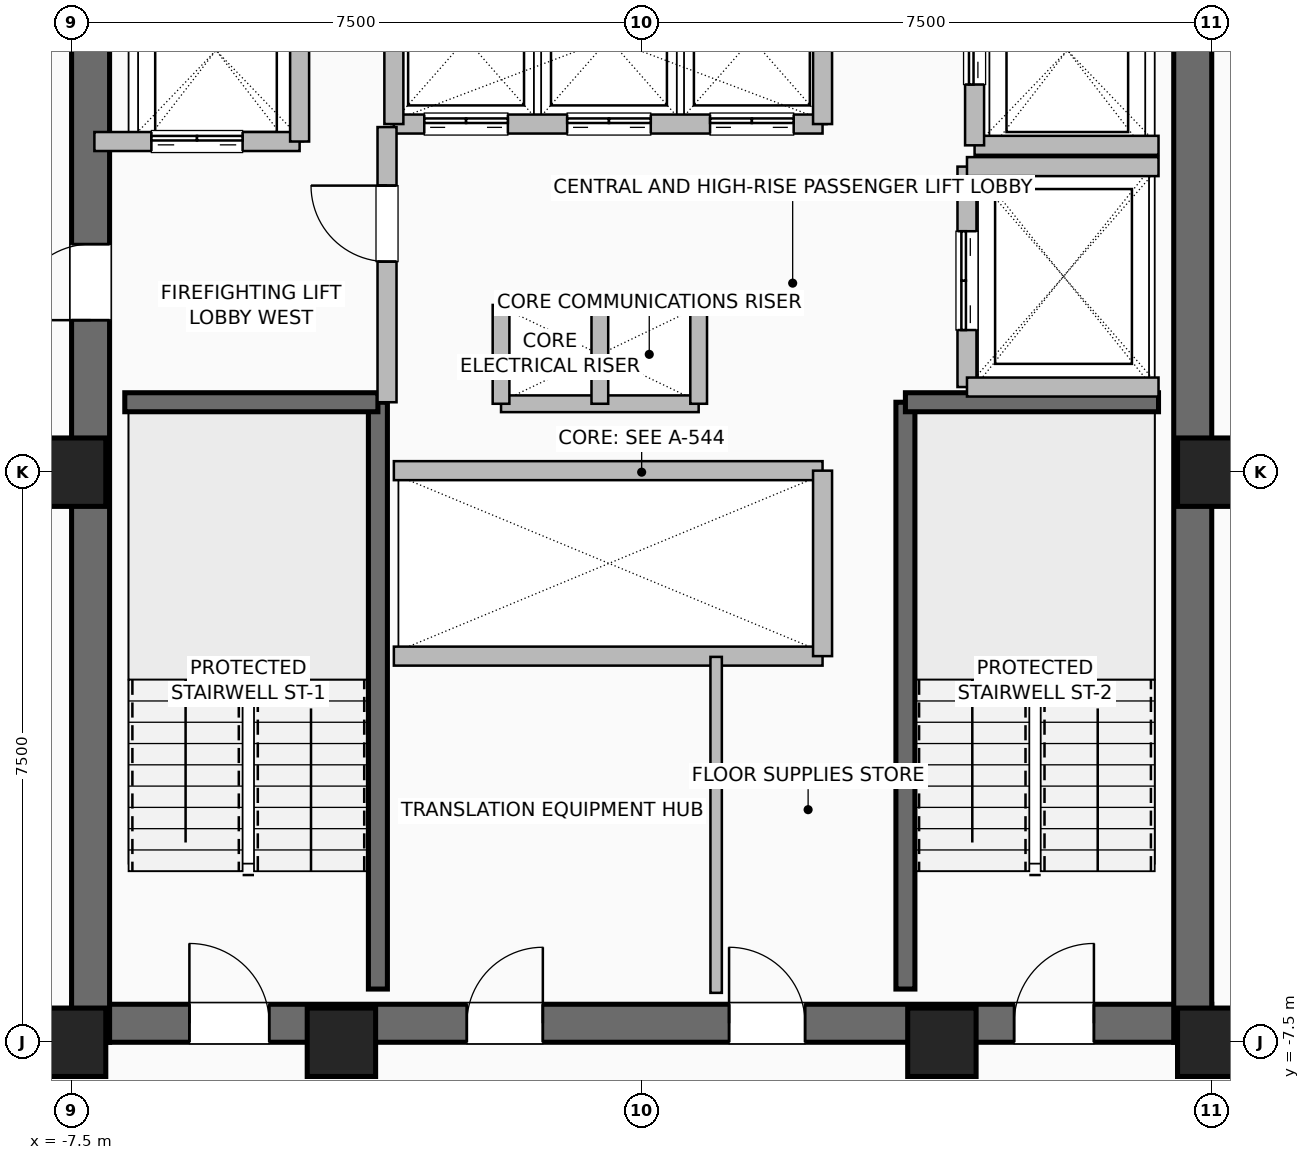
"""IFC4 building model, lengths in metres.
Left out: names, types, materials, properties, quantities, classifications, styles, units other than length and angle.
Written with IfcOpenShell. Run it as: python <this file> out.ifc"""

import sys

from ifc_helpers import new_model, si_unit, direction, frame, frame_2d, origin, origin_2d, place, context, subcontext, project, spatial, rectangle, hollow_rectangle, extrude, element, fill, save


model = new_model("IFC4")
c1 = context("Model", 3, precision=1e-05, world=origin(), true_north=direction((0.0, 1.0)))
c2 = subcontext(c1, "Body", "Model", "MODEL_VIEW")
j1 = project(units=[si_unit("LENGTHUNIT", "METRE"), si_unit("PLANEANGLEUNIT", "RADIAN")], contexts=[c1])
p1 = place(None, origin())
s1 = spatial("IfcSite", under=j1, at=p1, CompositionType="ELEMENT")
p2 = place(p1, origin())
s2 = spatial("IfcBuilding", under=s1, at=p2, CompositionType="ELEMENT")
p3 = place(p2, frame((0.0, 0.0, 169.8)))
s3 = spatial("IfcBuildingStorey", under=s2, at=p3, CompositionType="ELEMENT", Elevation=169.8)
for number, where, z_axis, x_axis in (
    (1, (-7.5, -7.5, 0.0), (0.0, 0.0, 1.0), (1.0, 0.0, 0.0)),
    (2, (-3.95, -7.5, 0.0), (0.0, 0.0, 1.0), (1.0, 0.0, 0.0)),
    (3, (3.95, -7.5, 0.0), (0.0, 0.0, 1.0), (1.0, 0.0, 0.0)),
    (4, (7.5, -7.5, 0.0), (0.0, 0.0, 1.0), (1.0, 0.0, 0.0)),
    (5, (7.5, 0.0, 0.0), (0.0, 0.0, 1.0), (1.0, 0.0, 0.0)),
    (6, (-7.5, 0.0, 0.0), (0.0, 0.0, 1.0), (1.0, 0.0, 0.0)),
):
    element("IfcColumn", number, at=place(p3, frame(where, z_axis=z_axis, x_axis=x_axis)), inside=s3, PredefinedType="COLUMN", context=c2, shape_type="SweptSolid", body=[
        extrude(hollow_rectangle(XDim=0.9, YDim=0.9, WallThickness=0.045, at=origin_2d()), origin(), (0.0, 0.0, 1.0), 3.6),
    ])
p4 = place(p3, frame((-7.5, -7.25, 0.0), z_axis=(0.0, 0.0, 1.0), x_axis=(1.0, 0.0, 0.0)))
e7 = element("IfcWall", 7, at=p4, inside=s3, PredefinedType="SHEAR", context=c2, shape_type="SweptSolid", body=[
    extrude(rectangle(XDim=15.0, YDim=0.5, at=frame_2d((7.5, 0.0))), origin(), (0.0, 0.0, 1.0), 3.36),
])
p5 = place(p4, frame((1.55, 0.0, 0.0)))
e8 = element("IfcOpeningElement", 8, at=p5, cuts=e7, PredefinedType="OPENING", context=c2, shape_type="SweptSolid", body=[
    extrude(rectangle(XDim=1.05, YDim=2.08, at=frame_2d((0.525, 1.04))), frame((0.0, 0.26, 0.0), z_axis=(0.0, -1.0, 0.0), x_axis=(1.0, 0.0, 0.0)), (0.0, 0.0, 1.0), 0.52),
])
p6 = place(p4, frame((12.4, 0.0, 0.0)))
e9 = element("IfcOpeningElement", 9, at=p6, cuts=e7, PredefinedType="OPENING", context=c2, shape_type="SweptSolid", body=[
    extrude(rectangle(XDim=1.05, YDim=2.08, at=frame_2d((0.525, 1.04))), frame((0.0, 0.26, 0.0), z_axis=(0.0, -1.0, 0.0), x_axis=(1.0, 0.0, 0.0)), (0.0, 0.0, 1.0), 0.52),
])
p7 = place(p4, frame((5.2, 0.0, 0.0)))
e10 = element("IfcOpeningElement", 10, at=p7, cuts=e7, PredefinedType="OPENING", context=c2, shape_type="SweptSolid", body=[
    extrude(rectangle(XDim=1.0, YDim=2.08, at=frame_2d((0.5, 1.04))), frame((0.0, 0.26, 0.0), z_axis=(0.0, -1.0, 0.0), x_axis=(1.0, 0.0, 0.0)), (0.0, 0.0, 1.0), 0.52),
])
p8 = place(p4, frame((8.65, 0.0, 0.0)))
e11 = element("IfcOpeningElement", 11, at=p8, cuts=e7, PredefinedType="OPENING", context=c2, shape_type="SweptSolid", body=[
    extrude(rectangle(XDim=1.0, YDim=2.08, at=frame_2d((0.5, 1.04))), frame((0.0, 0.26, 0.0), z_axis=(0.0, -1.0, 0.0), x_axis=(1.0, 0.0, 0.0)), (0.0, 0.0, 1.0), 0.52),
])
p9 = place(p3, frame((-7.25, -7.5, 0.0), z_axis=(0.0, 0.0, 1.0), x_axis=(0.0, 1.0, 0.0)))
e12 = element("IfcWall", 12, at=p9, inside=s3, PredefinedType="SHEAR", context=c2, shape_type="SweptSolid", body=[
    extrude(rectangle(XDim=15.0, YDim=0.5, at=frame_2d((7.5, 0.0))), origin(), (0.0, 0.0, 1.0), 3.36),
])
p10 = place(p9, frame((9.5, 0.0, 0.0)))
e13 = element("IfcOpeningElement", 13, at=p10, cuts=e12, PredefinedType="OPENING", context=c2, shape_type="SweptSolid", body=[
    extrude(rectangle(XDim=1.0, YDim=2.08, at=frame_2d((0.5, 1.04))), frame((0.0, 0.26, 0.0), z_axis=(0.0, -1.0, 0.0), x_axis=(1.0, 0.0, 0.0)), (0.0, 0.0, 1.0), 0.52),
])
p11 = place(p3, frame((7.25, -7.5, 0.0), z_axis=(0.0, 0.0, 1.0), x_axis=(0.0, 1.0, 0.0)))
e14 = element("IfcWall", 14, at=p11, inside=s3, PredefinedType="SHEAR", context=c2, shape_type="SweptSolid", body=[
    extrude(rectangle(XDim=15.0, YDim=0.5, at=frame_2d((7.5, 0.0))), origin(), (0.0, 0.0, 1.0), 3.36),
])
p12 = place(p3, frame((-3.47, -6.8, 0.0), z_axis=(0.0, 0.0, 1.0), x_axis=(0.0, 1.0, 0.0)))
e15 = element("IfcWall", 15, at=p12, inside=s3, PredefinedType="SHEAR", context=c2, shape_type="SweptSolid", body=[
    extrude(rectangle(XDim=7.72, YDim=0.25, at=frame_2d((3.86, 0.0))), origin(), (0.0, 0.0, 1.0), 3.36),
])
p13 = place(p3, frame((-6.8, 0.92, 0.0), z_axis=(0.0, 0.0, 1.0), x_axis=(1.0, 0.0, 0.0)))
e16 = element("IfcWall", 16, at=p13, inside=s3, PredefinedType="SHEAR", context=c2, shape_type="SweptSolid", body=[
    extrude(rectangle(XDim=3.33, YDim=0.25, at=frame_2d((1.665, 0.0))), origin(), (0.0, 0.0, 1.0), 3.36),
])
p14 = place(p3, frame((3.47, -6.8, 0.0), z_axis=(0.0, 0.0, 1.0), x_axis=(0.0, 1.0, 0.0)))
e17 = element("IfcWall", 17, at=p14, inside=s3, PredefinedType="SHEAR", context=c2, shape_type="SweptSolid", body=[
    extrude(rectangle(XDim=7.72, YDim=0.25, at=frame_2d((3.86, 0.0))), origin(), (0.0, 0.0, 1.0), 3.36),
])
p15 = place(p3, frame((3.47, 0.92, 0.0), z_axis=(0.0, 0.0, 1.0), x_axis=(1.0, 0.0, 0.0)))
e18 = element("IfcWall", 18, at=p15, inside=s3, PredefinedType="SHEAR", context=c2, shape_type="SweptSolid", body=[
    extrude(rectangle(XDim=3.33, YDim=0.25, at=frame_2d((1.665, 0.0))), origin(), (0.0, 0.0, 1.0), 3.36),
])
for number, where, z_axis, x_axis in (
    (19, (-1.85, 2.2, 0.0), (0.0, 0.0, 1.0), (1.0, 0.0, 0.0)),
    (20, (-1.85, 0.9, 0.0), (0.0, 0.0, 1.0), (1.0, 0.0, 0.0)),
):
    element("IfcWall", number, at=place(p3, frame(where, z_axis=z_axis, x_axis=x_axis)), inside=s3, PredefinedType="PARTITIONING", context=c2, shape_type="SweptSolid", body=[
        extrude(rectangle(XDim=2.6, YDim=0.22, at=frame_2d((1.3, 0.0))), origin(), (0.0, 0.0, 1.0), 3.36),
    ])
for number, where, z_axis, x_axis in (
    (21, (-0.55, 0.9, 0.0), (0.0, 0.0, 1.0), (0.0, 1.0, 0.0)),
    (22, (0.75, 0.9, 0.0), (0.0, 0.0, 1.0), (0.0, 1.0, 0.0)),
    (23, (-1.85, 0.9, 0.0), (0.0, 0.0, 1.0), (0.0, 1.0, 0.0)),
):
    element("IfcWall", number, at=place(p3, frame(where, z_axis=z_axis, x_axis=x_axis)), inside=s3, PredefinedType="PARTITIONING", context=c2, shape_type="SweptSolid", body=[
        extrude(rectangle(XDim=1.3, YDim=0.22, at=frame_2d((0.65, 0.0))), origin(), (0.0, 0.0, 1.0), 3.36),
    ])
for number, where, z_axis, x_axis in (
    (24, (-3.26, 0.02, 0.0), (0.0, 0.0, 1.0), (1.0, 0.0, 0.0)),
    (25, (-3.26, -2.42, 0.0), (0.0, 0.0, 1.0), (1.0, 0.0, 0.0)),
):
    element("IfcWall", number, at=place(p3, frame(where, z_axis=z_axis, x_axis=x_axis)), inside=s3, PredefinedType="SHEAR", context=c2, shape_type="SweptSolid", body=[
        extrude(rectangle(XDim=5.64, YDim=0.25, at=frame_2d((2.82, 0.0))), origin(), (0.0, 0.0, 1.0), 3.36),
    ])
p16 = place(p3, frame((2.38, -2.42, 0.0), z_axis=(0.0, 0.0, 1.0), x_axis=(0.0, 1.0, 0.0)))
e26 = element("IfcWall", 26, at=p16, inside=s3, PredefinedType="SHEAR", context=c2, shape_type="SweptSolid", body=[
    extrude(rectangle(XDim=2.44, YDim=0.25, at=frame_2d((1.22, 0.0))), origin(), (0.0, 0.0, 1.0), 3.36),
])
p17 = place(p3, frame((-3.26, 4.58, 0.0), z_axis=(0.0, 0.0, 1.0), x_axis=(1.0, 0.0, 0.0)))
e27 = element("IfcWall", 27, at=p17, inside=s3, PredefinedType="SHEAR", context=c2, shape_type="SweptSolid", body=[
    extrude(rectangle(XDim=5.64, YDim=0.25, at=frame_2d((2.82, 0.0))), origin(), (0.0, 0.0, 1.0), 3.36),
])
p18 = place(p17, frame((0.4, 0.0, 0.0)))
e28 = element("IfcOpeningElement", 28, at=p18, cuts=e27, PredefinedType="OPENING", context=c2, shape_type="SweptSolid", body=[
    extrude(rectangle(XDim=1.1, YDim=2.2, at=frame_2d((0.55, 1.1))), frame((0.0, 0.135, 0.0), z_axis=(0.0, -1.0, 0.0), x_axis=(1.0, 0.0, 0.0)), (0.0, 0.0, 1.0), 0.27),
])
p19 = place(p17, frame((2.28, 0.0, 0.0)))
e29 = element("IfcOpeningElement", 29, at=p19, cuts=e27, PredefinedType="OPENING", context=c2, shape_type="SweptSolid", body=[
    extrude(rectangle(XDim=1.1, YDim=2.2, at=frame_2d((0.55, 1.1))), frame((0.0, 0.135, 0.0), z_axis=(0.0, -1.0, 0.0), x_axis=(1.0, 0.0, 0.0)), (0.0, 0.0, 1.0), 0.27),
])
p20 = place(p17, frame((4.16, 0.0, 0.0)))
e30 = element("IfcOpeningElement", 30, at=p20, cuts=e27, PredefinedType="OPENING", context=c2, shape_type="SweptSolid", body=[
    extrude(rectangle(XDim=1.1, YDim=2.2, at=frame_2d((0.55, 1.1))), frame((0.0, 0.135, 0.0), z_axis=(0.0, -1.0, 0.0), x_axis=(1.0, 0.0, 0.0)), (0.0, 0.0, 1.0), 0.27),
])
for number, where, z_axis, x_axis in (
    (31, (-3.26, 4.58, 0.0), (0.0, 0.0, 1.0), (0.0, 1.0, 0.0)),
    (32, (2.38, 4.58, 0.0), (0.0, 0.0, 1.0), (0.0, 1.0, 0.0)),
):
    element("IfcWall", number, at=place(p3, frame(where, z_axis=z_axis, x_axis=x_axis)), inside=s3, PredefinedType="SHEAR", context=c2, shape_type="SweptSolid", body=[
        extrude(rectangle(XDim=2.22, YDim=0.25, at=frame_2d((1.11, 0.0))), origin(), (0.0, 0.0, 1.0), 3.36),
    ])
p21 = place(p3, frame((-7.2, 4.35, 0.0), z_axis=(0.0, 0.0, 1.0), x_axis=(1.0, 0.0, 0.0)))
e33 = element("IfcWall", 33, at=p21, inside=s3, PredefinedType="SHEAR", context=c2, shape_type="SweptSolid", body=[
    extrude(rectangle(XDim=2.7, YDim=0.25, at=frame_2d((1.35, 0.0))), origin(), (0.0, 0.0, 1.0), 3.36),
])
p22 = place(p21, frame((0.75, 0.0, 0.0)))
e34 = element("IfcOpeningElement", 34, at=p22, cuts=e33, PredefinedType="OPENING", context=c2, shape_type="SweptSolid", body=[
    extrude(rectangle(XDim=1.2, YDim=2.2, at=frame_2d((0.6, 1.1))), frame((0.0, 0.135, 0.0), z_axis=(0.0, -1.0, 0.0), x_axis=(1.0, 0.0, 0.0)), (0.0, 0.0, 1.0), 0.27),
])
p23 = place(p3, frame((-4.5, 4.35, 0.0), z_axis=(0.0, 0.0, 1.0), x_axis=(0.0, 1.0, 0.0)))
e35 = element("IfcWall", 35, at=p23, inside=s3, PredefinedType="SHEAR", context=c2, shape_type="SweptSolid", body=[
    extrude(rectangle(XDim=2.85, YDim=0.25, at=frame_2d((1.425, 0.0))), origin(), (0.0, 0.0, 1.0), 3.36),
])
p24 = place(p3, frame((4.38, 4.3, 0.0), z_axis=(0.0, 0.0, 1.0), x_axis=(1.0, 0.0, 0.0)))
e36 = element("IfcWall", 36, at=p24, inside=s3, PredefinedType="SHEAR", context=c2, shape_type="SweptSolid", body=[
    extrude(rectangle(XDim=2.42, YDim=0.25, at=frame_2d((1.21, 0.0))), origin(), (0.0, 0.0, 1.0), 3.36),
])
p25 = place(p3, frame((4.38, 4.3, 0.0), z_axis=(0.0, 0.0, 1.0), x_axis=(0.0, 1.0, 0.0)))
e37 = element("IfcWall", 37, at=p25, inside=s3, PredefinedType="SHEAR", context=c2, shape_type="SweptSolid", body=[
    extrude(rectangle(XDim=2.5, YDim=0.25, at=frame_2d((1.25, 0.0))), origin(), (0.0, 0.0, 1.0), 3.36),
])
p26 = place(p25, frame((0.8, 0.0, 0.0)))
e38 = element("IfcOpeningElement", 38, at=p26, cuts=e37, PredefinedType="OPENING", context=c2, shape_type="SweptSolid", body=[
    extrude(rectangle(XDim=1.2, YDim=2.2, at=frame_2d((0.6, 1.1))), frame((0.0, 0.135, 0.0), z_axis=(0.0, -1.0, 0.0), x_axis=(1.0, 0.0, 0.0)), (0.0, 0.0, 1.0), 0.27),
])
p27 = place(p3, frame((4.28, 1.12, 0.0), z_axis=(0.0, 0.0, 1.0), x_axis=(0.0, 1.0, 0.0)))
e39 = element("IfcWall", 39, at=p27, inside=s3, PredefinedType="SHEAR", context=c2, shape_type="SweptSolid", body=[
    extrude(rectangle(XDim=2.9, YDim=0.25, at=frame_2d((1.45, 0.0))), origin(), (0.0, 0.0, 1.0), 3.36),
])
p28 = place(p27, frame((0.75, 0.0, 0.0)))
e40 = element("IfcOpeningElement", 40, at=p28, cuts=e39, PredefinedType="OPENING", context=c2, shape_type="SweptSolid", body=[
    extrude(rectangle(XDim=1.3, YDim=2.3, at=frame_2d((0.65, 1.15))), frame((0.0, 0.135, 0.0), z_axis=(0.0, -1.0, 0.0), x_axis=(1.0, 0.0, 0.0)), (0.0, 0.0, 1.0), 0.27),
])
for number, where, z_axis, x_axis in (
    (41, (4.28, 1.12, 0.0), (0.0, 0.0, 1.0), (1.0, 0.0, 0.0)),
    (42, (4.28, 4.02, 0.0), (0.0, 0.0, 1.0), (1.0, 0.0, 0.0)),
):
    element("IfcWall", number, at=place(p3, frame(where, z_axis=z_axis, x_axis=x_axis)), inside=s3, PredefinedType="SHEAR", context=c2, shape_type="SweptSolid", body=[
        extrude(rectangle(XDim=2.52, YDim=0.25, at=frame_2d((1.26, 0.0))), origin(), (0.0, 0.0, 1.0), 3.36),
    ])
p29 = place(p3, frame((-3.35, 0.92, 0.0), z_axis=(0.0, 0.0, 1.0), x_axis=(0.0, 1.0, 0.0)))
e43 = element("IfcWall", 43, at=p29, inside=s3, PredefinedType="SHEAR", context=c2, shape_type="SweptSolid", body=[
    extrude(rectangle(XDim=3.62, YDim=0.25, at=frame_2d((1.81, 0.0))), origin(), (0.0, 0.0, 1.0), 3.36),
])
p30 = place(p29, frame((1.85, 0.0, 0.0)))
e44 = element("IfcOpeningElement", 44, at=p30, cuts=e43, PredefinedType="OPENING", context=c2, shape_type="SweptSolid", body=[
    extrude(rectangle(XDim=1.0, YDim=2.08, at=frame_2d((0.5, 1.04))), frame((0.0, 0.135, 0.0), z_axis=(0.0, -1.0, 0.0), x_axis=(1.0, 0.0, 0.0)), (0.0, 0.0, 1.0), 0.27),
])
p31 = place(p3, frame((0.98, -6.85, 0.0), z_axis=(0.0, 0.0, 1.0), x_axis=(0.0, 1.0, 0.0)))
e45 = element("IfcWall", 45, at=p31, inside=s3, PredefinedType="PARTITIONING", context=c2, shape_type="SweptSolid", body=[
    extrude(rectangle(XDim=4.42, YDim=0.15, at=frame_2d((2.21, 0.0))), origin(), (0.0, 0.0, 1.0), 3.36),
])
p32 = place(p3, frame((7.45, -7.48, 0.0), z_axis=(0.0, 0.0, 1.0), x_axis=(1.0, 0.0, 0.0)))
e46 = element("IfcWall", 46, at=p32, inside=s3, PredefinedType="PARTITIONING", context=c2, shape_type="SweptSolid", body=[
    extrude(rectangle(XDim=0.95, YDim=0.15, at=frame_2d((0.475, 0.0))), origin(), (0.0, 0.0, 1.0), 3.36),
])
p33 = place(p5, origin())
e47 = element("IfcDoor", 47, at=p33, inside=s3, OperationType="SINGLE_SWING_LEFT", PredefinedType="DOOR", context=c2, shape_type="SweptSolid", body=[
    extrude(rectangle(XDim=1.05, YDim=2.08, at=frame_2d((0.525, 1.04))), frame((0.0, 0.025, 0.0), z_axis=(0.0, -1.0, 0.0), x_axis=(1.0, 0.0, 0.0)), (0.0, 0.0, 1.0), 0.05),
])
fill(e8, e47)
p34 = place(p6, origin())
e48 = element("IfcDoor", 48, at=p34, inside=s3, OperationType="SINGLE_SWING_RIGHT", PredefinedType="DOOR", context=c2, shape_type="SweptSolid", body=[
    extrude(rectangle(XDim=1.05, YDim=2.08, at=frame_2d((0.525, 1.04))), frame((0.0, 0.025, 0.0), z_axis=(0.0, -1.0, 0.0), x_axis=(1.0, 0.0, 0.0)), (0.0, 0.0, 1.0), 0.05),
])
fill(e9, e48)
p35 = place(p10, origin())
e49 = element("IfcDoor", 49, at=p35, inside=s3, OperationType="SINGLE_SWING_LEFT", PredefinedType="DOOR", context=c2, shape_type="SweptSolid", body=[
    extrude(rectangle(XDim=1.0, YDim=2.08, at=frame_2d((0.5, 1.04))), frame((0.0, 0.025, 0.0), z_axis=(0.0, -1.0, 0.0), x_axis=(1.0, 0.0, 0.0)), (0.0, 0.0, 1.0), 0.05),
])
fill(e13, e49)
p36 = place(p7, origin())
e50 = element("IfcDoor", 50, at=p36, inside=s3, OperationType="SINGLE_SWING_RIGHT", PredefinedType="DOOR", context=c2, shape_type="SweptSolid", body=[
    extrude(rectangle(XDim=1.0, YDim=2.08, at=frame_2d((0.5, 1.04))), frame((0.0, 0.025, 0.0), z_axis=(0.0, -1.0, 0.0), x_axis=(1.0, 0.0, 0.0)), (0.0, 0.0, 1.0), 0.05),
])
fill(e10, e50)
p37 = place(p8, origin())
e51 = element("IfcDoor", 51, at=p37, inside=s3, OperationType="SINGLE_SWING_LEFT", PredefinedType="DOOR", context=c2, shape_type="SweptSolid", body=[
    extrude(rectangle(XDim=1.0, YDim=2.08, at=frame_2d((0.5, 1.04))), frame((0.0, 0.025, 0.0), z_axis=(0.0, -1.0, 0.0), x_axis=(1.0, 0.0, 0.0)), (0.0, 0.0, 1.0), 0.05),
])
fill(e11, e51)
p38 = place(p18, origin())
e52 = element("IfcDoor", 52, at=p38, inside=s3, OperationType="DOUBLE_DOOR_SLIDING", PredefinedType="DOOR", context=c2, shape_type="SweptSolid", body=[
    extrude(rectangle(XDim=1.1, YDim=2.2, at=frame_2d((0.55, 1.1))), frame((0.0, 0.025, 0.0), z_axis=(0.0, -1.0, 0.0), x_axis=(1.0, 0.0, 0.0)), (0.0, 0.0, 1.0), 0.05),
])
fill(e28, e52)
p39 = place(p19, origin())
e53 = element("IfcDoor", 53, at=p39, inside=s3, OperationType="DOUBLE_DOOR_SLIDING", PredefinedType="DOOR", context=c2, shape_type="SweptSolid", body=[
    extrude(rectangle(XDim=1.1, YDim=2.2, at=frame_2d((0.55, 1.1))), frame((0.0, 0.025, 0.0), z_axis=(0.0, -1.0, 0.0), x_axis=(1.0, 0.0, 0.0)), (0.0, 0.0, 1.0), 0.05),
])
fill(e29, e53)
p40 = place(p20, origin())
e54 = element("IfcDoor", 54, at=p40, inside=s3, OperationType="DOUBLE_DOOR_SLIDING", PredefinedType="DOOR", context=c2, shape_type="SweptSolid", body=[
    extrude(rectangle(XDim=1.1, YDim=2.2, at=frame_2d((0.55, 1.1))), frame((0.0, 0.025, 0.0), z_axis=(0.0, -1.0, 0.0), x_axis=(1.0, 0.0, 0.0)), (0.0, 0.0, 1.0), 0.05),
])
fill(e30, e54)
p41 = place(p22, origin())
e55 = element("IfcDoor", 55, at=p41, inside=s3, OperationType="DOUBLE_DOOR_SLIDING", PredefinedType="DOOR", context=c2, shape_type="SweptSolid", body=[
    extrude(rectangle(XDim=1.2, YDim=2.2, at=frame_2d((0.6, 1.1))), frame((0.0, 0.025, 0.0), z_axis=(0.0, -1.0, 0.0), x_axis=(1.0, 0.0, 0.0)), (0.0, 0.0, 1.0), 0.05),
])
fill(e34, e55)
p42 = place(p26, origin())
e56 = element("IfcDoor", 56, at=p42, inside=s3, OperationType="DOUBLE_DOOR_SLIDING", PredefinedType="DOOR", context=c2, shape_type="SweptSolid", body=[
    extrude(rectangle(XDim=1.2, YDim=2.2, at=frame_2d((0.6, 1.1))), frame((0.0, 0.025, 0.0), z_axis=(0.0, -1.0, 0.0), x_axis=(1.0, 0.0, 0.0)), (0.0, 0.0, 1.0), 0.05),
])
fill(e38, e56)
p43 = place(p28, origin())
e57 = element("IfcDoor", 57, at=p43, inside=s3, OperationType="DOUBLE_DOOR_SLIDING", PredefinedType="DOOR", context=c2, shape_type="SweptSolid", body=[
    extrude(rectangle(XDim=1.3, YDim=2.3, at=frame_2d((0.65, 1.15))), frame((0.0, 0.025, 0.0), z_axis=(0.0, -1.0, 0.0), x_axis=(1.0, 0.0, 0.0)), (0.0, 0.0, 1.0), 0.05),
])
fill(e40, e57)
p44 = place(p30, origin())
e58 = element("IfcDoor", 58, at=p44, inside=s3, OperationType="SINGLE_SWING_RIGHT", PredefinedType="DOOR", context=c2, shape_type="SweptSolid", body=[
    extrude(rectangle(XDim=1.0, YDim=2.08, at=frame_2d((0.5, 1.04))), frame((0.0, 0.025, 0.0), z_axis=(0.0, -1.0, 0.0), x_axis=(1.0, 0.0, 0.0)), (0.0, 0.0, 1.0), 0.05),
])
fill(e44, e58)
save(model, sys.argv[1])
